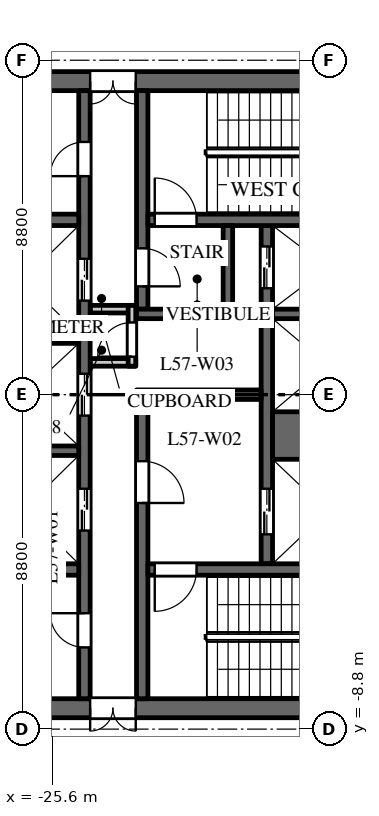
"""IFC4 building model, lengths in metres.
Left out: names, types, materials, properties, quantities, classifications, styles, units other than length and angle.
Written with IfcOpenShell. Run it as: python <this file> out.ifc"""

import sys

from ifc_helpers import new_model, si_unit, direction, frame, frame_2d, origin, place, context, subcontext, project, spatial, rectangle, extrude, element, fill, save


model = new_model("IFC4")
c1 = context("Model", 3, precision=1e-05, world=origin(), true_north=direction((0.0, 1.0)))
c2 = subcontext(c1, "Body", "Model", "MODEL_VIEW")
j1 = project(units=[si_unit("LENGTHUNIT", "METRE"), si_unit("PLANEANGLEUNIT", "RADIAN")], contexts=[c1])
p1 = place(None, origin())
s1 = spatial("IfcSite", under=j1, at=p1, CompositionType="ELEMENT")
p2 = place(p1, origin())
s2 = spatial("IfcBuilding", under=s1, at=p2, CompositionType="ELEMENT")
p3 = place(p2, frame((0.0, 0.0, 269.5)))
s3 = spatial("IfcBuildingStorey", under=s2, at=p3, CompositionType="ELEMENT", Elevation=269.5)
p4 = place(p3, frame((-16.5, 8.25, 0.0), z_axis=(0.0, 0.0, 1.0), x_axis=(-1.0, 0.0, 0.0)))
e1 = element("IfcWall", 1, at=p4, inside=s3, PredefinedType="SHEAR", context=c2, shape_type="SweptSolid", body=[
    extrude(rectangle(XDim=15.0, YDim=0.5, at=frame_2d((7.5, 0.0))), origin(), (0.0, 0.0, 1.0), 3.7),
])
p5 = place(p4, frame((6.9, 0.0, 0.0)))
e2 = element("IfcOpeningElement", 2, at=p5, cuts=e1, PredefinedType="OPENING", context=c2, shape_type="SweptSolid", body=[
    extrude(rectangle(XDim=1.2, YDim=2.1, at=frame_2d((0.6, 1.05))), frame((0.0, 0.26, 0.0), z_axis=(0.0, -1.0, 0.0), x_axis=(1.0, 0.0, 0.0)), (0.0, 0.0, 1.0), 0.52),
])
p6 = place(p4, frame((12.95, 0.0, 0.0)))
e3 = element("IfcOpeningElement", 3, at=p6, cuts=e1, PredefinedType="OPENING", context=c2, shape_type="SweptSolid", body=[
    extrude(rectangle(XDim=0.9, YDim=2.1, at=frame_2d((0.45, 1.05))), frame((0.0, 0.26, 0.0), z_axis=(0.0, -1.0, 0.0), x_axis=(1.0, 0.0, 0.0)), (0.0, 0.0, 1.0), 0.52),
])
p7 = place(p3, frame((-16.5, -8.25, 0.0), z_axis=(0.0, 0.0, 1.0), x_axis=(-1.0, 0.0, 0.0)))
e4 = element("IfcWall", 4, at=p7, inside=s3, PredefinedType="SHEAR", context=c2, shape_type="SweptSolid", body=[
    extrude(rectangle(XDim=15.0, YDim=0.5, at=frame_2d((7.5, 0.0))), origin(), (0.0, 0.0, 1.0), 3.7),
])
p8 = place(p7, frame((6.9, 0.0, 0.0)))
e5 = element("IfcOpeningElement", 5, at=p8, cuts=e4, PredefinedType="OPENING", context=c2, shape_type="SweptSolid", body=[
    extrude(rectangle(XDim=1.2, YDim=2.1, at=frame_2d((0.6, 1.05))), frame((0.0, 0.26, 0.0), z_axis=(0.0, -1.0, 0.0), x_axis=(1.0, 0.0, 0.0)), (0.0, 0.0, 1.0), 0.52),
])
p9 = place(p7, frame((12.95, 0.0, 0.0)))
e6 = element("IfcOpeningElement", 6, at=p9, cuts=e4, PredefinedType="OPENING", context=c2, shape_type="SweptSolid", body=[
    extrude(rectangle(XDim=0.9, YDim=2.1, at=frame_2d((0.45, 1.05))), frame((0.0, 0.26, 0.0), z_axis=(0.0, -1.0, 0.0), x_axis=(1.0, 0.0, 0.0)), (0.0, 0.0, 1.0), 0.52),
])
p10 = place(p3, frame((-19.95, -4.45, 0.0), z_axis=(0.0, 0.0, 1.0), x_axis=(0.0, 1.0, 0.0)))
e7 = element("IfcWall", 7, at=p10, inside=s3, PredefinedType="SHEAR", context=c2, shape_type="SweptSolid", body=[
    extrude(rectangle(XDim=8.9, YDim=0.3, at=frame_2d((4.45, 0.0))), origin(), (0.0, 0.0, 1.0), 3.7),
])
p11 = place(p10, frame((0.775, 0.0, 0.0)))
e8 = element("IfcOpeningElement", 8, at=p11, cuts=e7, PredefinedType="OPENING", context=c2, shape_type="SweptSolid", body=[
    extrude(rectangle(XDim=1.2, YDim=2.1, at=frame_2d((0.6, 1.05))), frame((0.0, 0.16, 0.0), z_axis=(0.0, -1.0, 0.0), x_axis=(1.0, 0.0, 0.0)), (0.0, 0.0, 1.0), 0.32),
])
p12 = place(p10, frame((7.25, 0.0, 0.0)))
e9 = element("IfcOpeningElement", 9, at=p12, cuts=e7, PredefinedType="OPENING", context=c2, shape_type="SweptSolid", body=[
    extrude(rectangle(XDim=1.1, YDim=2.1, at=frame_2d((0.55, 1.05))), frame((0.0, 0.16, 0.0), z_axis=(0.0, -1.0, 0.0), x_axis=(1.0, 0.0, 0.0)), (0.0, 0.0, 1.0), 0.32),
])
p13 = place(p3, frame((-24.75, -8.0, 0.0), z_axis=(0.0, 0.0, 1.0), x_axis=(0.0, 1.0, 0.0)))
e10 = element("IfcWall", 10, at=p13, inside=s3, PredefinedType="SHEAR", context=c2, shape_type="SweptSolid", body=[
    extrude(rectangle(XDim=16.0, YDim=0.3, at=frame_2d((8.0, 0.0))), origin(), (0.0, 0.0, 1.0), 3.7),
])
p14 = place(p13, frame((4.425, 0.0, 0.0)))
e11 = element("IfcOpeningElement", 11, at=p14, cuts=e10, PredefinedType="OPENING", context=c2, shape_type="SweptSolid", body=[
    extrude(rectangle(XDim=1.1, YDim=2.1, at=frame_2d((0.55, 1.05))), frame((0.0, 0.16, 0.0), z_axis=(0.0, -1.0, 0.0), x_axis=(1.0, 0.0, 0.0)), (0.0, 0.0, 1.0), 0.32),
])
p15 = place(p13, frame((7.45, 0.0, 0.0)))
e12 = element("IfcOpeningElement", 12, at=p15, cuts=e10, PredefinedType="OPENING", context=c2, shape_type="SweptSolid", body=[
    extrude(rectangle(XDim=1.1, YDim=2.1, at=frame_2d((0.55, 1.05))), frame((0.0, 0.16, 0.0), z_axis=(0.0, -1.0, 0.0), x_axis=(1.0, 0.0, 0.0)), (0.0, 0.0, 1.0), 0.32),
])
p16 = place(p13, frame((10.475, 0.0, 0.0)))
e13 = element("IfcOpeningElement", 13, at=p16, cuts=e10, PredefinedType="OPENING", context=c2, shape_type="SweptSolid", body=[
    extrude(rectangle(XDim=1.1, YDim=2.1, at=frame_2d((0.55, 1.05))), frame((0.0, 0.16, 0.0), z_axis=(0.0, -1.0, 0.0), x_axis=(1.0, 0.0, 0.0)), (0.0, 0.0, 1.0), 0.32),
])
p17 = place(p13, frame((13.75, 0.0, 0.0)))
e14 = element("IfcOpeningElement", 14, at=p17, cuts=e10, PredefinedType="OPENING", context=c2, shape_type="SweptSolid", body=[
    extrude(rectangle(XDim=0.9, YDim=2.1, at=frame_2d((0.45, 1.05))), frame((0.0, 0.16, 0.0), z_axis=(0.0, -1.0, 0.0), x_axis=(1.0, 0.0, 0.0)), (0.0, 0.0, 1.0), 0.32),
])
p18 = place(p13, frame((1.35, 0.0, 0.0)))
e15 = element("IfcOpeningElement", 15, at=p18, cuts=e10, PredefinedType="OPENING", context=c2, shape_type="SweptSolid", body=[
    extrude(rectangle(XDim=0.9, YDim=2.1, at=frame_2d((0.45, 1.05))), frame((0.0, 0.16, 0.0), z_axis=(0.0, -1.0, 0.0), x_axis=(1.0, 0.0, 0.0)), (0.0, 0.0, 1.0), 0.32),
])
p19 = place(p3, frame((-20.1, 0.0, 0.0), z_axis=(0.0, 0.0, 1.0), x_axis=(-1.0, 0.0, 0.0)))
e16 = element("IfcWall", 16, at=p19, inside=s3, PredefinedType="SHEAR", context=c2, shape_type="SweptSolid", body=[
    extrude(rectangle(XDim=3.28, YDim=0.25, at=frame_2d((1.64, 0.0))), origin(), (0.0, 0.0, 1.0), 3.7),
])
for number, where, z_axis, x_axis in (
    (17, (-23.4, 0.85, 0.0), (0.0, 0.0, 1.0), (-1.0, 0.0, 0.0)),
    (18, (-23.4, 2.25, 0.0), (0.0, 0.0, 1.0), (-1.0, 0.0, 0.0)),
):
    element("IfcWall", number, at=place(p3, frame(where, z_axis=z_axis, x_axis=x_axis)), inside=s3, PredefinedType="PARTITIONING", context=c2, shape_type="SweptSolid", body=[
        extrude(rectangle(XDim=1.2, YDim=0.2, at=frame_2d((0.6, 0.0))), origin(), (0.0, 0.0, 1.0), 3.7),
    ])
p20 = place(p3, frame((-23.5, 0.75, 0.0), z_axis=(0.0, 0.0, 1.0), x_axis=(0.0, 1.0, 0.0)))
e19 = element("IfcWall", 19, at=p20, inside=s3, PredefinedType="PARTITIONING", context=c2, shape_type="SweptSolid", body=[
    extrude(rectangle(XDim=1.6, YDim=0.2, at=frame_2d((0.8, 0.0))), origin(), (0.0, 0.0, 1.0), 3.7),
])
p21 = place(p20, frame((0.25, 0.0, 0.0)))
e20 = element("IfcOpeningElement", 20, at=p21, cuts=e19, PredefinedType="OPENING", context=c2, shape_type="SweptSolid", body=[
    extrude(rectangle(XDim=0.9, YDim=2.1, at=frame_2d((0.45, 1.05))), frame((0.0, 0.11, 0.0), z_axis=(0.0, -1.0, 0.0), x_axis=(1.0, 0.0, 0.0)), (0.0, 0.0, 1.0), 0.22),
])
p22 = place(p3, frame((-24.9, 4.6, 0.0), z_axis=(0.0, 0.0, 1.0), x_axis=(-1.0, 0.0, 0.0)))
e21 = element("IfcWall", 21, at=p22, inside=s3, PredefinedType="SHEAR", context=c2, shape_type="SweptSolid", body=[
    extrude(rectangle(XDim=6.1, YDim=0.3, at=frame_2d((3.05, 0.0))), origin(), (0.0, 0.0, 1.0), 3.7),
])
p23 = place(p22, frame((4.2, 0.0, 0.0)))
e22 = element("IfcOpeningElement", 22, at=p23, cuts=e21, PredefinedType="OPENING", context=c2, shape_type="SweptSolid", body=[
    extrude(rectangle(XDim=0.9, YDim=2.1, at=frame_2d((0.45, 1.05))), frame((0.0, 0.16, 0.0), z_axis=(0.0, -1.0, 0.0), x_axis=(1.0, 0.0, 0.0)), (0.0, 0.0, 1.0), 0.32),
])
p24 = place(p3, frame((-24.9, -4.6, 0.0), z_axis=(0.0, 0.0, 1.0), x_axis=(-1.0, 0.0, 0.0)))
e23 = element("IfcWall", 23, at=p24, inside=s3, PredefinedType="SHEAR", context=c2, shape_type="SweptSolid", body=[
    extrude(rectangle(XDim=6.1, YDim=0.3, at=frame_2d((3.05, 0.0))), origin(), (0.0, 0.0, 1.0), 3.7),
])
p25 = place(p3, frame((-16.9, -1.075, 0.0), z_axis=(0.0, 0.0, 1.0), x_axis=(-1.0, 0.0, 0.0)))
e24 = element("IfcWall", 24, at=p25, inside=s3, PredefinedType="SHEAR", context=c2, shape_type="SweptSolid", body=[
    extrude(rectangle(XDim=2.9, YDim=1.25, at=frame_2d((1.45, 0.0))), origin(), (0.0, 0.0, 1.0), 3.7),
])
for number, where, z_axis, x_axis in (
    (25, (-16.9, 2.125, 0.0), (0.0, 0.0, 1.0), (-1.0, 0.0, 0.0)),
    (26, (-24.9, -1.475, 0.0), (0.0, 0.0, 1.0), (-1.0, 0.0, 0.0)),
    (27, (-24.9, 1.475, 0.0), (0.0, 0.0, 1.0), (-1.0, 0.0, 0.0)),
):
    element("IfcWall", number, at=place(p3, frame(where, z_axis=z_axis, x_axis=x_axis)), inside=s3, PredefinedType="SHEAR", context=c2, shape_type="SweptSolid", body=[
        extrude(rectangle(XDim=2.9, YDim=0.25, at=frame_2d((1.45, 0.0))), origin(), (0.0, 0.0, 1.0), 3.7),
    ])
p26 = place(p3, frame((-23.23, 2.25, 0.0), z_axis=(0.0, 0.0, 1.0), x_axis=(0.0, 1.0, 0.0)))
e28 = element("IfcWall", 28, at=p26, inside=s3, PredefinedType="SHEAR", context=c2, shape_type="SweptSolid", body=[
    extrude(rectangle(XDim=5.75, YDim=0.3, at=frame_2d((2.875, 0.0))), origin(), (0.0, 0.0, 1.0), 3.7),
])
p27 = place(p26, frame((0.6, 0.0, 0.0)))
e29 = element("IfcOpeningElement", 29, at=p27, cuts=e28, PredefinedType="OPENING", context=c2, shape_type="SweptSolid", body=[
    extrude(rectangle(XDim=1.0, YDim=2.1, at=frame_2d((0.5, 1.05))), frame((0.0, 0.16, 0.0), z_axis=(0.0, -1.0, 0.0), x_axis=(1.0, 0.0, 0.0)), (0.0, 0.0, 1.0), 0.32),
])
p28 = place(p3, frame((-23.23, -8.0, 0.0), z_axis=(0.0, 0.0, 1.0), x_axis=(0.0, 1.0, 0.0)))
e30 = element("IfcWall", 30, at=p28, inside=s3, PredefinedType="SHEAR", context=c2, shape_type="SweptSolid", body=[
    extrude(rectangle(XDim=7.875, YDim=0.3, at=frame_2d((3.938, 0.0))), origin(), (0.0, 0.0, 1.0), 3.7),
])
p29 = place(p28, frame((5.15, 0.0, 0.0)))
e31 = element("IfcOpeningElement", 31, at=p29, cuts=e30, PredefinedType="OPENING", context=c2, shape_type="SweptSolid", body=[
    extrude(rectangle(XDim=1.1, YDim=2.1, at=frame_2d((0.55, 1.05))), frame((0.0, 0.16, 0.0), z_axis=(0.0, -1.0, 0.0), x_axis=(1.0, 0.0, 0.0)), (0.0, 0.0, 1.0), 0.32),
])
p30 = place(p3, frame((-16.9, 4.6, 0.0), z_axis=(0.0, 0.0, 1.0), x_axis=(-1.0, 0.0, 0.0)))
e32 = element("IfcWall", 32, at=p30, inside=s3, PredefinedType="SHEAR", context=c2, shape_type="SweptSolid", body=[
    extrude(rectangle(XDim=6.18, YDim=0.3, at=frame_2d((3.09, 0.0))), origin(), (0.0, 0.0, 1.0), 3.7),
])
p31 = place(p30, frame((4.9, 0.0, 0.0)))
e33 = element("IfcOpeningElement", 33, at=p31, cuts=e32, PredefinedType="OPENING", context=c2, shape_type="SweptSolid", body=[
    extrude(rectangle(XDim=1.1, YDim=2.1, at=frame_2d((0.55, 1.05))), frame((0.0, 0.16, 0.0), z_axis=(0.0, -1.0, 0.0), x_axis=(1.0, 0.0, 0.0)), (0.0, 0.0, 1.0), 0.32),
])
p32 = place(p3, frame((-16.9, -4.6, 0.0), z_axis=(0.0, 0.0, 1.0), x_axis=(-1.0, 0.0, 0.0)))
e34 = element("IfcWall", 34, at=p32, inside=s3, PredefinedType="SHEAR", context=c2, shape_type="SweptSolid", body=[
    extrude(rectangle(XDim=6.18, YDim=0.3, at=frame_2d((3.09, 0.0))), origin(), (0.0, 0.0, 1.0), 3.7),
])
p33 = place(p32, frame((4.9, 0.0, 0.0)))
e35 = element("IfcOpeningElement", 35, at=p33, cuts=e34, PredefinedType="OPENING", context=c2, shape_type="SweptSolid", body=[
    extrude(rectangle(XDim=1.1, YDim=2.1, at=frame_2d((0.55, 1.05))), frame((0.0, 0.16, 0.0), z_axis=(0.0, -1.0, 0.0), x_axis=(1.0, 0.0, 0.0)), (0.0, 0.0, 1.0), 0.32),
])
p34 = place(p3, frame((-20.85, 2.125, 0.0), z_axis=(0.0, 0.0, 1.0), x_axis=(-1.0, 0.0, 0.0)))
e36 = element("IfcWall", 36, at=p34, inside=s3, PredefinedType="SHEAR", context=c2, shape_type="SweptSolid", body=[
    extrude(rectangle(XDim=2.53, YDim=0.25, at=frame_2d((1.265, 0.0))), origin(), (0.0, 0.0, 1.0), 3.7),
])
p35 = place(p3, frame((-20.975, 2.25, 0.0), z_axis=(0.0, 0.0, 1.0), x_axis=(0.0, 1.0, 0.0)))
e37 = element("IfcWall", 37, at=p35, inside=s3, PredefinedType="SHEAR", context=c2, shape_type="SweptSolid", body=[
    extrude(rectangle(XDim=2.2, YDim=0.25, at=frame_2d((1.1, 0.0))), origin(), (0.0, 0.0, 1.0), 3.7),
])
p36 = place(p11, origin())
e38 = element("IfcDoor", 38, at=p36, inside=s3, OperationType="DOUBLE_DOOR_SLIDING", PredefinedType="DOOR", context=c2, shape_type="SweptSolid", body=[
    extrude(rectangle(XDim=1.2, YDim=2.1, at=frame_2d((0.6, 1.05))), frame((0.0, 0.025, 0.0), z_axis=(0.0, -1.0, 0.0), x_axis=(1.0, 0.0, 0.0)), (0.0, 0.0, 1.0), 0.05),
])
fill(e8, e38)
p37 = place(p12, origin())
e39 = element("IfcDoor", 39, at=p37, inside=s3, OperationType="DOUBLE_DOOR_SLIDING", PredefinedType="DOOR", context=c2, shape_type="SweptSolid", body=[
    extrude(rectangle(XDim=1.1, YDim=2.1, at=frame_2d((0.55, 1.05))), frame((0.0, 0.025, 0.0), z_axis=(0.0, -1.0, 0.0), x_axis=(1.0, 0.0, 0.0)), (0.0, 0.0, 1.0), 0.05),
])
fill(e9, e39)
p38 = place(p14, origin())
e40 = element("IfcDoor", 40, at=p38, inside=s3, OperationType="DOUBLE_DOOR_SLIDING", PredefinedType="DOOR", context=c2, shape_type="SweptSolid", body=[
    extrude(rectangle(XDim=1.1, YDim=2.1, at=frame_2d((0.55, 1.05))), frame((0.0, 0.025, 0.0), z_axis=(0.0, -1.0, 0.0), x_axis=(1.0, 0.0, 0.0)), (0.0, 0.0, 1.0), 0.05),
])
fill(e11, e40)
p39 = place(p15, origin())
e41 = element("IfcDoor", 41, at=p39, inside=s3, OperationType="DOUBLE_DOOR_SLIDING", PredefinedType="DOOR", context=c2, shape_type="SweptSolid", body=[
    extrude(rectangle(XDim=1.1, YDim=2.1, at=frame_2d((0.55, 1.05))), frame((0.0, 0.025, 0.0), z_axis=(0.0, -1.0, 0.0), x_axis=(1.0, 0.0, 0.0)), (0.0, 0.0, 1.0), 0.05),
])
fill(e12, e41)
p40 = place(p16, origin())
e42 = element("IfcDoor", 42, at=p40, inside=s3, OperationType="DOUBLE_DOOR_SLIDING", PredefinedType="DOOR", context=c2, shape_type="SweptSolid", body=[
    extrude(rectangle(XDim=1.1, YDim=2.1, at=frame_2d((0.55, 1.05))), frame((0.0, 0.025, 0.0), z_axis=(0.0, -1.0, 0.0), x_axis=(1.0, 0.0, 0.0)), (0.0, 0.0, 1.0), 0.05),
])
fill(e13, e42)
p41 = place(p31, origin())
e43 = element("IfcDoor", 43, at=p41, inside=s3, OperationType="SINGLE_SWING_RIGHT", PredefinedType="DOOR", context=c2, shape_type="SweptSolid", body=[
    extrude(rectangle(XDim=1.1, YDim=2.1, at=frame_2d((0.55, 1.05))), frame((0.0, 0.025, 0.0), z_axis=(0.0, -1.0, 0.0), x_axis=(1.0, 0.0, 0.0)), (0.0, 0.0, 1.0), 0.05),
])
fill(e33, e43)
p42 = place(p33, origin())
e44 = element("IfcDoor", 44, at=p42, inside=s3, OperationType="SINGLE_SWING_LEFT", PredefinedType="DOOR", context=c2, shape_type="SweptSolid", body=[
    extrude(rectangle(XDim=1.1, YDim=2.1, at=frame_2d((0.55, 1.05))), frame((0.0, 0.025, 0.0), z_axis=(0.0, -1.0, 0.0), x_axis=(1.0, 0.0, 0.0)), (0.0, 0.0, 1.0), 0.05),
])
fill(e35, e44)
p43 = place(p29, origin())
e45 = element("IfcDoor", 45, at=p43, inside=s3, OperationType="SINGLE_SWING_LEFT", PredefinedType="DOOR", context=c2, shape_type="SweptSolid", body=[
    extrude(rectangle(XDim=1.1, YDim=2.1, at=frame_2d((0.55, 1.05))), frame((0.0, 0.025, 0.0), z_axis=(0.0, -1.0, 0.0), x_axis=(1.0, 0.0, 0.0)), (0.0, 0.0, 1.0), 0.05),
])
fill(e31, e45)
p44 = place(p27, origin())
e46 = element("IfcDoor", 46, at=p44, inside=s3, OperationType="SINGLE_SWING_LEFT", PredefinedType="DOOR", context=c2, shape_type="SweptSolid", body=[
    extrude(rectangle(XDim=1.0, YDim=2.1, at=frame_2d((0.5, 1.05))), frame((0.0, 0.025, 0.0), z_axis=(0.0, -1.0, 0.0), x_axis=(1.0, 0.0, 0.0)), (0.0, 0.0, 1.0), 0.05),
])
fill(e29, e46)
p45 = place(p5, origin())
e47 = element("IfcDoor", 47, at=p45, inside=s3, OperationType="DOUBLE_DOOR_DOUBLE_SWING", PredefinedType="DOOR", context=c2, shape_type="SweptSolid", body=[
    extrude(rectangle(XDim=1.2, YDim=2.1, at=frame_2d((0.6, 1.05))), frame((0.0, 0.025, 0.0), z_axis=(0.0, -1.0, 0.0), x_axis=(1.0, 0.0, 0.0)), (0.0, 0.0, 1.0), 0.05),
])
fill(e2, e47)
p46 = place(p8, origin())
e48 = element("IfcDoor", 48, at=p46, inside=s3, OperationType="DOUBLE_DOOR_DOUBLE_SWING", PredefinedType="DOOR", context=c2, shape_type="SweptSolid", body=[
    extrude(rectangle(XDim=1.2, YDim=2.1, at=frame_2d((0.6, 1.05))), frame((0.0, 0.025, 0.0), z_axis=(0.0, -1.0, 0.0), x_axis=(1.0, 0.0, 0.0)), (0.0, 0.0, 1.0), 0.05),
])
fill(e5, e48)
p47 = place(p17, origin())
e49 = element("IfcDoor", 49, at=p47, inside=s3, OperationType="SINGLE_SWING_RIGHT", PredefinedType="DOOR", context=c2, shape_type="SweptSolid", body=[
    extrude(rectangle(XDim=0.9, YDim=2.1, at=frame_2d((0.45, 1.05))), frame((0.0, 0.025, 0.0), z_axis=(0.0, -1.0, 0.0), x_axis=(1.0, 0.0, 0.0)), (0.0, 0.0, 1.0), 0.05),
])
fill(e14, e49)
p48 = place(p18, origin())
e50 = element("IfcDoor", 50, at=p48, inside=s3, OperationType="SINGLE_SWING_LEFT", PredefinedType="DOOR", context=c2, shape_type="SweptSolid", body=[
    extrude(rectangle(XDim=0.9, YDim=2.1, at=frame_2d((0.45, 1.05))), frame((0.0, 0.025, 0.0), z_axis=(0.0, -1.0, 0.0), x_axis=(1.0, 0.0, 0.0)), (0.0, 0.0, 1.0), 0.05),
])
fill(e15, e50)
p49 = place(p21, origin())
e51 = element("IfcDoor", 51, at=p49, inside=s3, OperationType="SINGLE_SWING_RIGHT", PredefinedType="DOOR", context=c2, shape_type="SweptSolid", body=[
    extrude(rectangle(XDim=0.9, YDim=2.1, at=frame_2d((0.45, 1.05))), frame((0.0, 0.025, 0.0), z_axis=(0.0, -1.0, 0.0), x_axis=(1.0, 0.0, 0.0)), (0.0, 0.0, 1.0), 0.05),
])
fill(e20, e51)
save(model, sys.argv[1])
